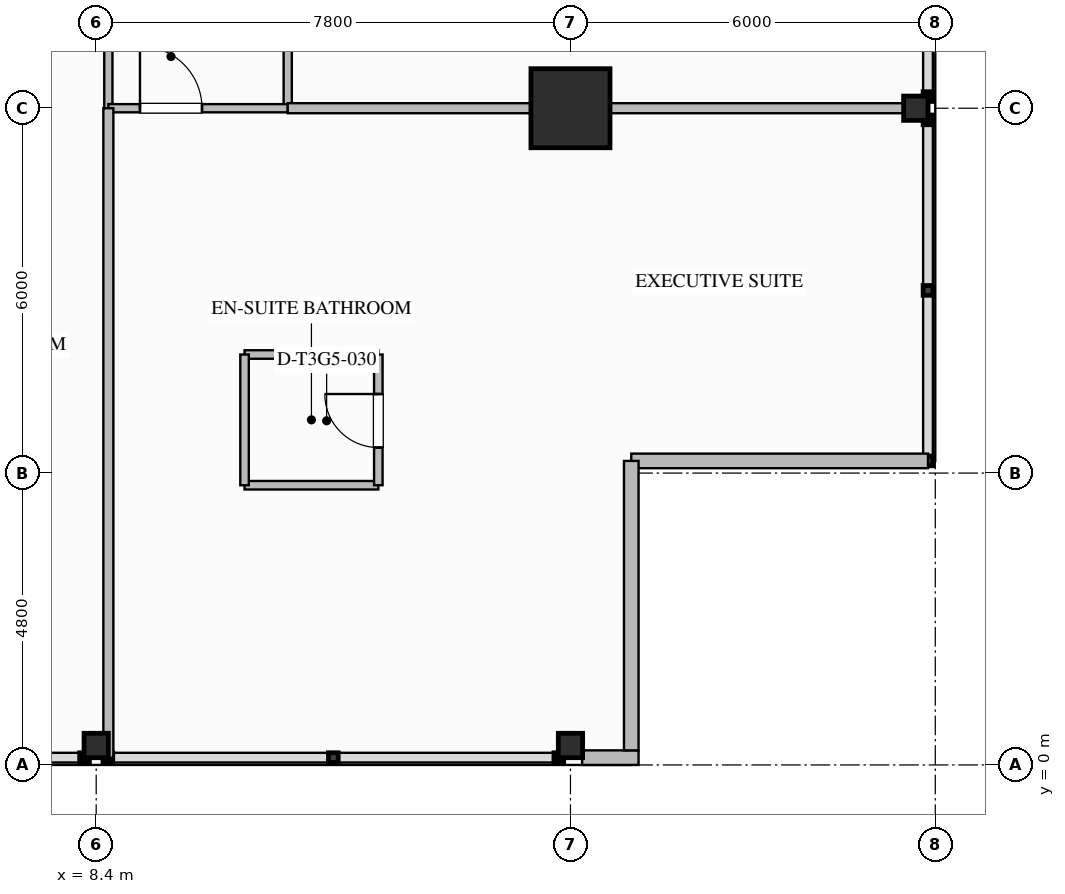
"""IFC4 building model, lengths in metres.
Left out: names, types, materials, properties, quantities, classifications, styles, units other than length and angle.
Written with IfcOpenShell. Run it as: python <this file> out.ifc"""

import sys

from ifc_helpers import new_model, si_unit, direction, frame, frame_2d, origin, origin_2d, place, context, subcontext, project, spatial, rectangle, i_section, extrude, element, fill, save


model = new_model("IFC4")
c1 = context("Model", 3, precision=1e-05, world=origin(), true_north=direction((0.0, 1.0)))
c2 = subcontext(c1, "Body", "Model", "MODEL_VIEW")
j1 = project(units=[si_unit("LENGTHUNIT", "METRE"), si_unit("PLANEANGLEUNIT", "RADIAN")], contexts=[c1])
p1 = place(None, origin())
s1 = spatial("IfcSite", under=j1, at=p1, CompositionType="ELEMENT")
p2 = place(p1, origin())
s2 = spatial("IfcBuilding", under=s1, at=p2, CompositionType="ELEMENT")
p3 = place(p2, frame((0.0, 0.0, 193.0)))
s3 = spatial("IfcBuildingStorey", under=s2, at=p3, CompositionType="ELEMENT", Elevation=193.0)
p4 = place(p3, frame((16.2, 10.8, 0.0), z_axis=(0.0, 0.0, 1.0), x_axis=(1.0, 0.0, 0.0)))
e1 = element("IfcColumn", 1, at=p4, inside=s3, PredefinedType="COLUMN", context=c2, shape_type="SweptSolid", body=[
    extrude(rectangle(XDim=1.3, YDim=1.3, at=origin_2d()), origin(), (0.0, 0.0, 1.0), 3.55),
])
for number, where, z_axis, x_axis in (
    (2, (21.88, 10.8, 0.0), (0.0, 0.0, 1.0), (1.0, 0.0, 0.0)),
    (3, (8.4, 0.32, 0.0), (0.0, 0.0, 1.0), (0.0, 1.0, 0.0)),
    (4, (16.2, 0.32, 0.0), (0.0, 0.0, 1.0), (0.0, 1.0, 0.0)),
):
    element("IfcColumn", number, at=place(p3, frame(where, z_axis=z_axis, x_axis=x_axis)), inside=s3, PredefinedType="COLUMN", context=c2, shape_type="SweptSolid", body=[
        extrude(i_section(OverallWidth=0.401, OverallDepth=0.399, WebThickness=0.025, FlangeThickness=0.04, FilletRadius=0.025, at=origin_2d()), origin(), (0.0, 0.0, 1.0), 3.547),
    ])
p5 = place(p3, frame((17.32, 0.12, 0.0), z_axis=(0.0, 0.0, 1.0), x_axis=(-1.0, 0.0, 0.0)))
e5 = element("IfcWall", 5, at=p5, inside=s3, PredefinedType="STANDARD", context=c2, shape_type="SweptSolid", body=[
    extrude(rectangle(XDim=0.928, YDim=0.24, at=frame_2d((0.464, 0.0))), origin(), (0.0, 0.0, 1.0), 3.29),
])
p6 = place(p3, frame((22.08, 5.0, 0.0), z_axis=(0.0, 0.0, 1.0), x_axis=(-1.0, 0.0, 0.0)))
e6 = element("IfcWall", 6, at=p6, inside=s3, PredefinedType="STANDARD", context=c2, shape_type="SweptSolid", body=[
    extrude(rectangle(XDim=4.88, YDim=0.24, at=frame_2d((2.44, 0.0))), origin(), (0.0, 0.0, 1.0), 3.29),
])
p7 = place(p3, frame((17.2, 5.0, 0.0), z_axis=(0.0, 0.0, 1.0), x_axis=(0.0, -1.0, 0.0)))
e7 = element("IfcWall", 7, at=p7, inside=s3, PredefinedType="STANDARD", context=c2, shape_type="SweptSolid", body=[
    extrude(rectangle(XDim=4.76, YDim=0.24, at=frame_2d((2.38, 0.0))), origin(), (0.0, 0.0, 1.0), 3.29),
])
p8 = place(p3, frame((8.6, 10.8, 0.0), z_axis=(0.0, 0.0, 1.0), x_axis=(0.0, 1.0, 0.0)))
e8 = element("IfcWall", 8, at=p8, inside=s3, PredefinedType="PARTITIONING", context=c2, shape_type="SweptSolid", body=[
    extrude(rectangle(XDim=5.0, YDim=0.135, at=frame_2d((2.5, 0.0))), origin(), (0.0, 0.0, 1.0), 2.667),
])
p9 = place(p3, frame((11.55, 10.8, 0.0), z_axis=(0.0, 0.0, 1.0), x_axis=(0.0, 1.0, 0.0)))
e9 = element("IfcWall", 9, at=p9, inside=s3, PredefinedType="PARTITIONING", context=c2, shape_type="SweptSolid", body=[
    extrude(rectangle(XDim=32.4, YDim=0.135, at=frame_2d((16.2, 0.0))), origin(), (0.0, 0.0, 1.0), 3.29),
])
p10 = place(p9, frame((1.545, 0.0, 0.0)))
e10 = element("IfcOpeningElement", 10, at=p10, cuts=e9, PredefinedType="OPENING", context=c2, shape_type="SweptSolid", body=[
    extrude(rectangle(XDim=0.96, YDim=2.15, at=frame_2d((0.48, 1.075))), frame((0.0, 0.077, 0.0), z_axis=(0.0, -1.0, 0.0), x_axis=(1.0, 0.0, 0.0)), (0.0, 0.0, 1.0), 0.155),
])
p11 = place(p9, frame((9.48, 0.0, 0.0)))
e11 = element("IfcOpeningElement", 11, at=p11, cuts=e9, PredefinedType="OPENING", context=c2, shape_type="SweptSolid", body=[
    extrude(rectangle(XDim=1.02, YDim=2.15, at=frame_2d((0.51, 1.075))), frame((0.0, 0.077, 0.0), z_axis=(0.0, -1.0, 0.0), x_axis=(1.0, 0.0, 0.0)), (0.0, 0.0, 1.0), 0.155),
])
p12 = place(p9, frame((14.445, 0.0, 0.0)))
e12 = element("IfcOpeningElement", 12, at=p12, cuts=e9, PredefinedType="OPENING", context=c2, shape_type="SweptSolid", body=[
    extrude(rectangle(XDim=0.96, YDim=2.15, at=frame_2d((0.48, 1.075))), frame((0.0, 0.077, 0.0), z_axis=(0.0, -1.0, 0.0), x_axis=(1.0, 0.0, 0.0)), (0.0, 0.0, 1.0), 0.155),
])
p13 = place(p9, frame((21.3, 0.0, 0.0)))
e13 = element("IfcOpeningElement", 13, at=p13, cuts=e9, PredefinedType="OPENING", context=c2, shape_type="SweptSolid", body=[
    extrude(rectangle(XDim=1.02, YDim=2.15, at=frame_2d((0.51, 1.075))), frame((0.0, 0.077, 0.0), z_axis=(0.0, -1.0, 0.0), x_axis=(1.0, 0.0, 0.0)), (0.0, 0.0, 1.0), 0.155),
])
p14 = place(p9, frame((26.925, 0.0, 0.0)))
e14 = element("IfcOpeningElement", 14, at=p14, cuts=e9, PredefinedType="OPENING", context=c2, shape_type="SweptSolid", body=[
    extrude(rectangle(XDim=0.96, YDim=2.15, at=frame_2d((0.48, 1.075))), frame((0.0, 0.077, 0.0), z_axis=(0.0, -1.0, 0.0), x_axis=(1.0, 0.0, 0.0)), (0.0, 0.0, 1.0), 0.155),
])
p15 = place(p3, frame((8.6, 10.8, 0.0), z_axis=(0.0, 0.0, 1.0), x_axis=(1.0, 0.0, 0.0)))
e15 = element("IfcWall", 15, at=p15, inside=s3, PredefinedType="PARTITIONING", context=c2, shape_type="SweptSolid", body=[
    extrude(rectangle(XDim=2.95, YDim=0.135, at=frame_2d((1.475, 0.0))), origin(), (0.0, 0.0, 1.0), 2.58),
])
p16 = place(p15, frame((0.52, 0.0, 0.0)))
e16 = element("IfcOpeningElement", 16, at=p16, cuts=e15, PredefinedType="OPENING", context=c2, shape_type="SweptSolid", body=[
    extrude(rectangle(XDim=1.02, YDim=2.15, at=frame_2d((0.51, 1.075))), frame((0.0, 0.077, 0.0), z_axis=(0.0, -1.0, 0.0), x_axis=(1.0, 0.0, 0.0)), (0.0, 0.0, 1.0), 0.155),
])
p17 = place(p3, frame((8.6, 0.12, 0.0), z_axis=(0.0, 0.0, 1.0), x_axis=(0.0, 1.0, 0.0)))
e17 = element("IfcWall", 17, at=p17, inside=s3, PredefinedType="PARTITIONING", context=c2, shape_type="SweptSolid", body=[
    extrude(rectangle(XDim=10.68, YDim=0.165, at=frame_2d((5.34, 0.0))), origin(), (0.0, 0.0, 1.0), 2.58),
])
p18 = place(p3, frame((11.55, 10.8, 0.0), z_axis=(0.0, 0.0, 1.0), x_axis=(1.0, 0.0, 0.0)))
e18 = element("IfcWall", 18, at=p18, inside=s3, PredefinedType="PARTITIONING", context=c2, shape_type="SweptSolid", body=[
    extrude(rectangle(XDim=10.53, YDim=0.165, at=frame_2d((5.265, 0.0))), origin(), (0.0, 0.0, 1.0), 2.58),
])
for number, where, z_axis, x_axis in (
    (19, (10.84, 4.6, 0.0), (0.0, 0.0, 1.0), (1.0, 0.0, 0.0)),
    (20, (10.84, 6.75, 0.0), (0.0, 0.0, 1.0), (1.0, 0.0, 0.0)),
):
    element("IfcWall", number, at=place(p3, frame(where, z_axis=z_axis, x_axis=x_axis)), inside=s3, PredefinedType="PLUMBINGWALL", context=c2, shape_type="SweptSolid", body=[
        extrude(rectangle(XDim=2.2, YDim=0.14, at=frame_2d((1.1, 0.0))), origin(), (0.0, 0.0, 1.0), 3.29),
    ])
p19 = place(p3, frame((10.84, 4.6, 0.0), z_axis=(0.0, 0.0, 1.0), x_axis=(0.0, 1.0, 0.0)))
e21 = element("IfcWall", 21, at=p19, inside=s3, PredefinedType="PLUMBINGWALL", context=c2, shape_type="SweptSolid", body=[
    extrude(rectangle(XDim=2.15, YDim=0.14, at=frame_2d((1.075, 0.0))), origin(), (0.0, 0.0, 1.0), 3.29),
])
p20 = place(p3, frame((13.04, 4.6, 0.0), z_axis=(0.0, 0.0, 1.0), x_axis=(0.0, 1.0, 0.0)))
e22 = element("IfcWall", 22, at=p20, inside=s3, PredefinedType="PLUMBINGWALL", context=c2, shape_type="SweptSolid", body=[
    extrude(rectangle(XDim=2.15, YDim=0.14, at=frame_2d((1.075, 0.0))), origin(), (0.0, 0.0, 1.0), 3.29),
])
p21 = place(p20, frame((0.62, 0.0, 0.0)))
e23 = element("IfcOpeningElement", 23, at=p21, cuts=e22, PredefinedType="OPENING", context=c2, shape_type="SweptSolid", body=[
    extrude(rectangle(XDim=0.88, YDim=2.1, at=frame_2d((0.44, 1.05))), frame((0.0, 0.08, 0.0), z_axis=(0.0, -1.0, 0.0), x_axis=(1.0, 0.0, 0.0)), (0.0, 0.0, 1.0), 0.16),
])
p22 = place(p21, origin())
e24 = element("IfcDoor", 24, at=p22, inside=s3, OperationType="SINGLE_SWING_RIGHT", PredefinedType="DOOR", context=c2, shape_type="SweptSolid", body=[
    extrude(rectangle(XDim=0.88, YDim=2.1, at=frame_2d((0.44, 1.05))), frame((0.0, 0.025, 0.0), z_axis=(0.0, -1.0, 0.0), x_axis=(1.0, 0.0, 0.0)), (0.0, 0.0, 1.0), 0.05),
])
fill(e23, e24)
p23 = place(p16, origin())
e25 = element("IfcDoor", 25, at=p23, inside=s3, OperationType="SINGLE_SWING_LEFT", PredefinedType="DOOR", context=c2, shape_type="SweptSolid", body=[
    extrude(rectangle(XDim=1.02, YDim=2.15, at=frame_2d((0.51, 1.075))), frame((0.0, 0.025, 0.0), z_axis=(0.0, -1.0, 0.0), x_axis=(1.0, 0.0, 0.0)), (0.0, 0.0, 1.0), 0.05),
])
fill(e16, e25)
save(model, sys.argv[1])
